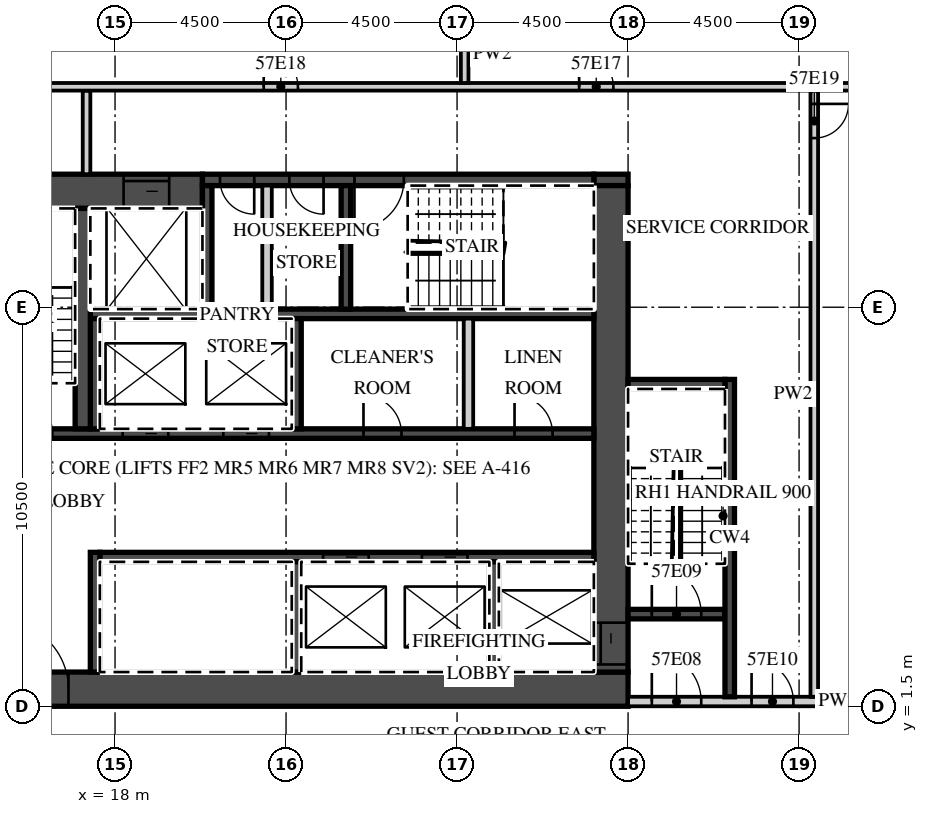
"""IFC4 building model, lengths in metres.
Left out: names, types, materials, properties, quantities, classifications, styles, units other than length and angle.
Written with IfcOpenShell. Run it as: python <this file> out.ifc"""

import sys

from ifc_helpers import new_model, si_unit, direction, frame, frame_2d, origin, place, context, subcontext, project, spatial, rectangle, extrude, element, fill, save


model = new_model("IFC4")
c1 = context("Model", 3, precision=1e-05, world=origin(), true_north=direction((0.0, 1.0)))
c2 = subcontext(c1, "Body", "Model", "MODEL_VIEW")
j1 = project(units=[si_unit("LENGTHUNIT", "METRE"), si_unit("PLANEANGLEUNIT", "RADIAN")], contexts=[c1])
p1 = place(None, origin())
s1 = spatial("IfcSite", under=j1, at=p1, CompositionType="ELEMENT")
p2 = place(p1, origin())
s2 = spatial("IfcBuilding", under=s1, at=p2, CompositionType="ELEMENT")
p3 = place(p2, frame((0.0, 0.0, 234.2)))
s3 = spatial("IfcBuildingStorey", under=s2, at=p3, CompositionType="ELEMENT", Elevation=234.2)
p4 = place(p3, frame((13.5, 1.95, 0.0), z_axis=(0.0, 0.0, 1.0), x_axis=(1.0, 0.0, 0.0)))
e1 = element("IfcWall", 1, at=p4, inside=s3, PredefinedType="SHEAR", context=c2, shape_type="SweptSolid", body=[
    extrude(rectangle(XDim=18.0, YDim=0.9, at=frame_2d((9.0, 0.0))), origin(), (0.0, 0.0, 1.0), 3.02),
])
p5 = place(p4, frame((1.475, 0.0, 0.0)))
e2 = element("IfcOpeningElement", 2, at=p5, cuts=e1, PredefinedType="OPENING", context=c2, shape_type="SweptSolid", body=[
    extrude(rectangle(XDim=1.8, YDim=2.1, at=frame_2d((0.9, 1.05))), frame((0.0, 0.46, 0.0), z_axis=(0.0, -1.0, 0.0), x_axis=(1.0, 0.0, 0.0)), (0.0, 0.0, 1.0), 0.92),
])
p6 = place(p3, frame((13.5, 15.05, 0.0), z_axis=(0.0, 0.0, 1.0), x_axis=(1.0, 0.0, 0.0)))
e3 = element("IfcWall", 3, at=p6, inside=s3, PredefinedType="SHEAR", context=c2, shape_type="SweptSolid", body=[
    extrude(rectangle(XDim=6.8, YDim=0.9, at=frame_2d((3.4, 0.0))), origin(), (0.0, 0.0, 1.0), 3.02),
])
p7 = place(p6, frame((4.725, 0.0, 0.0)))
e4 = element("IfcOpeningElement", 4, at=p7, cuts=e3, PredefinedType="OPENING", context=c2, shape_type="SweptSolid", body=[
    extrude(rectangle(XDim=1.2, YDim=2.1, at=frame_2d((0.6, 1.05))), frame((0.0, 0.46, 0.0), z_axis=(0.0, -1.0, 0.0), x_axis=(1.0, 0.0, 0.0)), (0.0, 0.0, 1.0), 0.92),
])
p8 = place(p3, frame((30.6, 15.35, 0.0), z_axis=(0.0, 0.0, 1.0), x_axis=(1.0, 0.0, 0.0)))
e5 = element("IfcWall", 5, at=p8, inside=s3, PredefinedType="SHEAR", context=c2, shape_type="SweptSolid", body=[
    extrude(rectangle(XDim=0.9, YDim=0.3, at=frame_2d((0.45, 0.0))), origin(), (0.0, 0.0, 1.0), 3.02),
])
p9 = place(p3, frame((20.3, 15.35, 0.0), z_axis=(0.0, 0.0, 1.0), x_axis=(1.0, 0.0, 0.0)))
e6 = element("IfcWall", 6, at=p9, inside=s3, PredefinedType="SHEAR", context=c2, shape_type="SweptSolid", body=[
    extrude(rectangle(XDim=10.3, YDim=0.3, at=frame_2d((5.15, 0.0))), origin(), (0.0, 0.0, 1.0), 3.02),
])
p10 = place(p9, frame((4.0, 0.0, 0.0)))
e7 = element("IfcOpeningElement", 7, at=p10, cuts=e6, PredefinedType="OPENING", context=c2, shape_type="SweptSolid", body=[
    extrude(rectangle(XDim=1.3, YDim=2.1, at=frame_2d((0.65, 1.05))), frame((0.0, 0.16, 0.0), z_axis=(0.0, -1.0, 0.0), x_axis=(1.0, 0.0, 0.0)), (0.0, 0.0, 1.0), 0.32),
])
p11 = place(p9, frame((2.288, 0.0, 0.0)))
e8 = element("IfcOpeningElement", 8, at=p11, cuts=e6, PredefinedType="OPENING", context=c2, shape_type="SweptSolid", body=[
    extrude(rectangle(XDim=0.9, YDim=2.1, at=frame_2d((0.45, 1.05))), frame((0.0, 0.16, 0.0), z_axis=(0.0, -1.0, 0.0), x_axis=(1.0, 0.0, 0.0)), (0.0, 0.0, 1.0), 0.32),
])
p12 = place(p9, frame((0.462, 0.0, 0.0)))
e9 = element("IfcOpeningElement", 9, at=p12, cuts=e6, PredefinedType="OPENING", context=c2, shape_type="SweptSolid", body=[
    extrude(rectangle(XDim=0.9, YDim=2.1, at=frame_2d((0.45, 1.05))), frame((0.0, 0.16, 0.0), z_axis=(0.0, -1.0, 0.0), x_axis=(1.0, 0.0, 0.0)), (0.0, 0.0, 1.0), 0.32),
])
p13 = place(p3, frame((31.05, 2.4, 0.0), z_axis=(0.0, 0.0, 1.0), x_axis=(0.0, 1.0, 0.0)))
e10 = element("IfcWall", 10, at=p13, inside=s3, PredefinedType="SHEAR", context=c2, shape_type="SweptSolid", body=[
    extrude(rectangle(XDim=12.8, YDim=0.9, at=frame_2d((6.4, 0.0))), origin(), (0.0, 0.0, 1.0), 3.02),
])
p14 = place(p13, frame((0.2, 0.0, 0.0)))
e11 = element("IfcOpeningElement", 11, at=p14, cuts=e10, PredefinedType="OPENING", context=c2, shape_type="SweptSolid", body=[
    extrude(rectangle(XDim=1.1, YDim=2.1, at=frame_2d((0.55, 1.05))), frame((0.0, 0.46, 0.0), z_axis=(0.0, -1.0, 0.0), x_axis=(1.0, 0.0, 0.0)), (0.0, 0.0, 1.0), 0.92),
])
p15 = place(p3, frame((17.6, 5.425, 0.0), z_axis=(0.0, 0.0, 1.0), x_axis=(1.0, 0.0, 0.0)))
e12 = element("IfcWall", 12, at=p15, inside=s3, PredefinedType="SHEAR", context=c2, shape_type="SweptSolid", body=[
    extrude(rectangle(XDim=13.0, YDim=0.25, at=frame_2d((6.5, 0.0))), origin(), (0.0, 0.0, 1.0), 3.02),
])
p16 = place(p15, frame((8.475, 0.0, 0.0)))
e13 = element("IfcOpeningElement", 13, at=p16, cuts=e12, PredefinedType="OPENING", context=c2, shape_type="SweptSolid", body=[
    extrude(rectangle(XDim=1.2, YDim=2.1, at=frame_2d((0.6, 1.05))), frame((0.0, 0.135, 0.0), z_axis=(0.0, -1.0, 0.0), x_axis=(1.0, 0.0, 0.0)), (0.0, 0.0, 1.0), 0.27),
])
p17 = place(p15, frame((5.875, 0.0, 0.0)))
e14 = element("IfcOpeningElement", 14, at=p17, cuts=e12, PredefinedType="OPENING", context=c2, shape_type="SweptSolid", body=[
    extrude(rectangle(XDim=1.2, YDim=2.1, at=frame_2d((0.6, 1.05))), frame((0.0, 0.135, 0.0), z_axis=(0.0, -1.0, 0.0), x_axis=(1.0, 0.0, 0.0)), (0.0, 0.0, 1.0), 0.27),
])
p18 = place(p3, frame((17.475, 2.4, 0.0), z_axis=(0.0, 0.0, 1.0), x_axis=(0.0, 1.0, 0.0)))
e15 = element("IfcWall", 15, at=p18, inside=s3, PredefinedType="SHEAR", context=c2, shape_type="SweptSolid", body=[
    extrude(rectangle(XDim=3.15, YDim=0.25, at=frame_2d((1.575, 0.0))), origin(), (0.0, 0.0, 1.0), 3.02),
])
for number, where, z_axis, x_axis in (
    (16, (27.975, 2.4, 0.0), (0.0, 0.0, 1.0), (0.0, 1.0, 0.0)),
    (17, (22.775, 2.4, 0.0), (0.0, 0.0, 1.0), (0.0, 1.0, 0.0)),
):
    element("IfcWall", number, at=place(p3, frame(where, z_axis=z_axis, x_axis=x_axis)), inside=s3, PredefinedType="SHEAR", context=c2, shape_type="SweptSolid", body=[
        extrude(rectangle(XDim=2.9, YDim=0.25, at=frame_2d((1.45, 0.0))), origin(), (0.0, 0.0, 1.0), 3.02),
    ])
p19 = place(p3, frame((14.4, 8.675, 0.0), z_axis=(0.0, 0.0, 1.0), x_axis=(1.0, 0.0, 0.0)))
e18 = element("IfcWall", 18, at=p19, inside=s3, PredefinedType="SHEAR", context=c2, shape_type="SweptSolid", body=[
    extrude(rectangle(XDim=16.2, YDim=0.25, at=frame_2d((8.1, 0.0))), origin(), (0.0, 0.0, 1.0), 3.02),
])
p20 = place(p19, frame((6.45, 0.0, 0.0)))
e19 = element("IfcOpeningElement", 19, at=p20, cuts=e18, PredefinedType="OPENING", context=c2, shape_type="SweptSolid", body=[
    extrude(rectangle(XDim=1.2, YDim=2.1, at=frame_2d((0.6, 1.05))), frame((0.0, 0.135, 0.0), z_axis=(0.0, -1.0, 0.0), x_axis=(1.0, 0.0, 0.0)), (0.0, 0.0, 1.0), 0.27),
])
p21 = place(p19, frame((3.8, 0.0, 0.0)))
e20 = element("IfcOpeningElement", 20, at=p21, cuts=e18, PredefinedType="OPENING", context=c2, shape_type="SweptSolid", body=[
    extrude(rectangle(XDim=1.2, YDim=2.1, at=frame_2d((0.6, 1.05))), frame((0.0, 0.135, 0.0), z_axis=(0.0, -1.0, 0.0), x_axis=(1.0, 0.0, 0.0)), (0.0, 0.0, 1.0), 0.27),
])
p22 = place(p19, frame((0.65, 0.0, 0.0)))
e21 = element("IfcOpeningElement", 21, at=p22, cuts=e18, PredefinedType="OPENING", context=c2, shape_type="SweptSolid", body=[
    extrude(rectangle(XDim=1.3, YDim=2.1, at=frame_2d((0.65, 1.05))), frame((0.0, 0.135, 0.0), z_axis=(0.0, -1.0, 0.0), x_axis=(1.0, 0.0, 0.0)), (0.0, 0.0, 1.0), 0.27),
])
p23 = place(p19, frame((14.113, 0.0, 0.0)))
e22 = element("IfcOpeningElement", 22, at=p23, cuts=e18, PredefinedType="OPENING", context=c2, shape_type="SweptSolid", body=[
    extrude(rectangle(XDim=1.0, YDim=2.1, at=frame_2d((0.5, 1.05))), frame((0.0, 0.135, 0.0), z_axis=(0.0, -1.0, 0.0), x_axis=(1.0, 0.0, 0.0)), (0.0, 0.0, 1.0), 0.27),
])
p24 = place(p19, frame((10.137, 0.0, 0.0)))
e23 = element("IfcOpeningElement", 23, at=p24, cuts=e18, PredefinedType="OPENING", context=c2, shape_type="SweptSolid", body=[
    extrude(rectangle(XDim=1.0, YDim=2.1, at=frame_2d((0.5, 1.05))), frame((0.0, 0.135, 0.0), z_axis=(0.0, -1.0, 0.0), x_axis=(1.0, 0.0, 0.0)), (0.0, 0.0, 1.0), 0.27),
])
p25 = place(p3, frame((17.35, 11.825, 0.0), z_axis=(0.0, 0.0, 1.0), x_axis=(1.0, 0.0, 0.0)))
e24 = element("IfcWall", 24, at=p25, inside=s3, PredefinedType="SHEAR", context=c2, shape_type="SweptSolid", body=[
    extrude(rectangle(XDim=13.25, YDim=0.25, at=frame_2d((6.625, 0.0))), origin(), (0.0, 0.0, 1.0), 3.02),
])
for number, where, z_axis, x_axis in (
    (25, (17.475, 8.8, 0.0), (0.0, 0.0, 1.0), (0.0, 1.0, 0.0)),
    (26, (22.775, 8.8, 0.0), (0.0, 0.0, 1.0), (0.0, 1.0, 0.0)),
):
    element("IfcWall", number, at=place(p3, frame(where, z_axis=z_axis, x_axis=x_axis)), inside=s3, PredefinedType="SHEAR", context=c2, shape_type="SweptSolid", body=[
        extrude(rectangle(XDim=2.9, YDim=0.25, at=frame_2d((1.45, 0.0))), origin(), (0.0, 0.0, 1.0), 3.02),
    ])
p26 = place(p3, frame((27.3, 8.8, 0.0), z_axis=(0.0, 0.0, 1.0), x_axis=(0.0, 1.0, 0.0)))
e27 = element("IfcWall", 27, at=p26, inside=s3, PredefinedType="PARTITIONING", context=c2, shape_type="SweptSolid", body=[
    extrude(rectangle(XDim=2.9, YDim=0.25, at=frame_2d((1.45, 0.0))), origin(), (0.0, 0.0, 1.0), 3.02),
])
p27 = place(p3, frame((17.15, 8.8, 0.0), z_axis=(0.0, 0.0, 1.0), x_axis=(0.0, 1.0, 0.0)))
e28 = element("IfcWall", 28, at=p27, inside=s3, PredefinedType="SHEAR", context=c2, shape_type="SweptSolid", body=[
    extrude(rectangle(XDim=5.8, YDim=0.4, at=frame_2d((2.9, 0.0))), origin(), (0.0, 0.0, 1.0), 3.02),
])
for number, where, z_axis, x_axis in (
    (29, (20.425, 11.95, 0.0), (0.0, 0.0, 1.0), (0.0, 1.0, 0.0)),
    (30, (24.075, 11.95, 0.0), (0.0, 0.0, 1.0), (0.0, 1.0, 0.0)),
):
    element("IfcWall", number, at=place(p3, frame(where, z_axis=z_axis, x_axis=x_axis)), inside=s3, PredefinedType="SHEAR", context=c2, shape_type="SweptSolid", body=[
        extrude(rectangle(XDim=3.25, YDim=0.25, at=frame_2d((1.625, 0.0))), origin(), (0.0, 0.0, 1.0), 3.02),
    ])
p28 = place(p3, frame((22.0, 11.95, 0.0), z_axis=(0.0, 0.0, 1.0), x_axis=(0.0, 1.0, 0.0)))
e31 = element("IfcWall", 31, at=p28, inside=s3, PredefinedType="PARTITIONING", context=c2, shape_type="SweptSolid", body=[
    extrude(rectangle(XDim=3.25, YDim=0.25, at=frame_2d((1.625, 0.0))), origin(), (0.0, 0.0, 1.0), 3.02),
])
p29 = place(p3, frame((31.5, 1.625, 0.0), z_axis=(0.0, 0.0, 1.0), x_axis=(1.0, 0.0, 0.0)))
e32 = element("IfcWall", 32, at=p29, inside=s3, PredefinedType="PARTITIONING", context=c2, shape_type="SweptSolid", body=[
    extrude(rectangle(XDim=11.04, YDim=0.25, at=frame_2d((5.52, 0.0))), origin(), (0.0, 0.0, 1.0), 3.02),
])
p30 = place(p29, frame((0.625, 0.0, 0.0)))
e33 = element("IfcOpeningElement", 33, at=p30, cuts=e32, PredefinedType="OPENING", context=c2, shape_type="SweptSolid", body=[
    extrude(rectangle(XDim=1.3, YDim=2.1, at=frame_2d((0.65, 1.05))), frame((0.0, 0.135, 0.0), z_axis=(0.0, -1.0, 0.0), x_axis=(1.0, 0.0, 0.0)), (0.0, 0.0, 1.0), 0.27),
])
p31 = place(p29, frame((3.25, 0.0, 0.0)))
e34 = element("IfcOpeningElement", 34, at=p31, cuts=e32, PredefinedType="OPENING", context=c2, shape_type="SweptSolid", body=[
    extrude(rectangle(XDim=1.1, YDim=2.1, at=frame_2d((0.55, 1.05))), frame((0.0, 0.135, 0.0), z_axis=(0.0, -1.0, 0.0), x_axis=(1.0, 0.0, 0.0)), (0.0, 0.0, 1.0), 0.27),
])
p32 = place(p3, frame((31.5, 3.925, 0.0), z_axis=(0.0, 0.0, 1.0), x_axis=(1.0, 0.0, 0.0)))
e35 = element("IfcWall", 35, at=p32, inside=s3, PredefinedType="SHEAR", context=c2, shape_type="SweptSolid", body=[
    extrude(rectangle(XDim=2.55, YDim=0.25, at=frame_2d((1.275, 0.0))), origin(), (0.0, 0.0, 1.0), 3.02),
])
p33 = place(p32, frame((0.625, 0.0, 0.0)))
e36 = element("IfcOpeningElement", 36, at=p33, cuts=e35, PredefinedType="OPENING", context=c2, shape_type="SweptSolid", body=[
    extrude(rectangle(XDim=1.3, YDim=2.1, at=frame_2d((0.65, 1.05))), frame((0.0, 0.135, 0.0), z_axis=(0.0, -1.0, 0.0), x_axis=(1.0, 0.0, 0.0)), (0.0, 0.0, 1.0), 0.27),
])
p34 = place(p3, frame((34.175, 1.75, 0.0), z_axis=(0.0, 0.0, 1.0), x_axis=(0.0, 1.0, 0.0)))
e37 = element("IfcWall", 37, at=p34, inside=s3, PredefinedType="SHEAR", context=c2, shape_type="SweptSolid", body=[
    extrude(rectangle(XDim=8.35, YDim=0.25, at=frame_2d((4.175, 0.0))), origin(), (0.0, 0.0, 1.0), 3.02),
])
p35 = place(p3, frame((31.5, 9.975, 0.0), z_axis=(0.0, 0.0, 1.0), x_axis=(1.0, 0.0, 0.0)))
e38 = element("IfcWall", 38, at=p35, inside=s3, PredefinedType="SHEAR", context=c2, shape_type="SweptSolid", body=[
    extrude(rectangle(XDim=2.55, YDim=0.25, at=frame_2d((1.275, 0.0))), origin(), (0.0, 0.0, 1.0), 3.02),
])
p36 = place(p3, frame((17.25, 15.5, 0.0), z_axis=(0.0, 0.0, 1.0), x_axis=(0.0, 1.0, 0.0)))
e39 = element("IfcWall", 39, at=p36, inside=s3, PredefinedType="PARTITIONING", context=c2, shape_type="SweptSolid", body=[
    extrude(rectangle(XDim=2.2, YDim=0.2, at=frame_2d((1.1, 0.0))), origin(), (0.0, 0.0, 1.0), 3.02),
])
p37 = place(p3, frame((36.4, 1.75, 0.0), z_axis=(0.0, 0.0, 1.0), x_axis=(0.0, 1.0, 0.0)))
e40 = element("IfcWall", 40, at=p37, inside=s3, PredefinedType="PARTITIONING", context=c2, shape_type="SweptSolid", body=[
    extrude(rectangle(XDim=15.95, YDim=0.2, at=frame_2d((7.975, 0.0))), origin(), (0.0, 0.0, 1.0), 3.02),
])
p38 = place(p37, frame((14.7, 0.0, 0.0)))
e41 = element("IfcOpeningElement", 41, at=p38, cuts=e40, PredefinedType="OPENING", context=c2, shape_type="SweptSolid", body=[
    extrude(rectangle(XDim=0.9, YDim=2.1, at=frame_2d((0.45, 1.05))), frame((0.0, 0.11, 0.0), z_axis=(0.0, -1.0, 0.0), x_axis=(1.0, 0.0, 0.0)), (0.0, 0.0, 1.0), 0.22),
])
p39 = place(p3, frame((13.6, 17.8, 0.0), z_axis=(0.0, 0.0, 1.0), x_axis=(1.0, 0.0, 0.0)))
e42 = element("IfcWall", 42, at=p39, inside=s3, PredefinedType="PARTITIONING", context=c2, shape_type="SweptSolid", body=[
    extrude(rectangle(XDim=28.657, YDim=0.2, at=frame_2d((14.329, 0.0))), origin(), (0.0, 0.0, 1.0), 3.02),
])
p40 = place(p39, frame((16.613, 0.0, 0.0)))
e43 = element("IfcOpeningElement", 43, at=p40, cuts=e42, PredefinedType="OPENING", context=c2, shape_type="SweptSolid", body=[
    extrude(rectangle(XDim=0.9, YDim=2.1, at=frame_2d((0.45, 1.05))), frame((0.0, 0.11, 0.0), z_axis=(0.0, -1.0, 0.0), x_axis=(1.0, 0.0, 0.0)), (0.0, 0.0, 1.0), 0.22),
])
p41 = place(p39, frame((8.312, 0.0, 0.0)))
e44 = element("IfcOpeningElement", 44, at=p41, cuts=e42, PredefinedType="OPENING", context=c2, shape_type="SweptSolid", body=[
    extrude(rectangle(XDim=0.9, YDim=2.1, at=frame_2d((0.45, 1.05))), frame((0.0, 0.11, 0.0), z_axis=(0.0, -1.0, 0.0), x_axis=(1.0, 0.0, 0.0)), (0.0, 0.0, 1.0), 0.22),
])
p42 = place(p3, frame((27.2, 17.9, 0.0), z_axis=(0.0, 0.0, 1.0), x_axis=(0.0, 1.0, 0.0)))
e45 = element("IfcWall", 45, at=p42, inside=s3, PredefinedType="PARTITIONING", context=c2, shape_type="SweptSolid", body=[
    extrude(rectangle(XDim=3.276, YDim=0.2, at=frame_2d((1.638, 0.0))), origin(), (0.0, 0.0, 1.0), 3.02),
])
p43 = place(p20, origin())
e46 = element("IfcDoor", 46, at=p43, inside=s3, OperationType="SLIDING_TO_LEFT", PredefinedType="DOOR", context=c2, shape_type="SweptSolid", body=[
    extrude(rectangle(XDim=1.2, YDim=2.1, at=frame_2d((0.6, 1.05))), frame((0.0, 0.025, 0.0), z_axis=(0.0, -1.0, 0.0), x_axis=(1.0, 0.0, 0.0)), (0.0, 0.0, 1.0), 0.05),
])
fill(e19, e46)
p44 = place(p21, origin())
e47 = element("IfcDoor", 47, at=p44, inside=s3, OperationType="SLIDING_TO_RIGHT", PredefinedType="DOOR", context=c2, shape_type="SweptSolid", body=[
    extrude(rectangle(XDim=1.2, YDim=2.1, at=frame_2d((0.6, 1.05))), frame((0.0, 0.025, 0.0), z_axis=(0.0, -1.0, 0.0), x_axis=(1.0, 0.0, 0.0)), (0.0, 0.0, 1.0), 0.05),
])
fill(e20, e47)
p45 = place(p16, origin())
e48 = element("IfcDoor", 48, at=p45, inside=s3, OperationType="SLIDING_TO_LEFT", PredefinedType="DOOR", context=c2, shape_type="SweptSolid", body=[
    extrude(rectangle(XDim=1.2, YDim=2.1, at=frame_2d((0.6, 1.05))), frame((0.0, 0.025, 0.0), z_axis=(0.0, -1.0, 0.0), x_axis=(1.0, 0.0, 0.0)), (0.0, 0.0, 1.0), 0.05),
])
fill(e13, e48)
p46 = place(p17, origin())
e49 = element("IfcDoor", 49, at=p46, inside=s3, OperationType="SLIDING_TO_RIGHT", PredefinedType="DOOR", context=c2, shape_type="SweptSolid", body=[
    extrude(rectangle(XDim=1.2, YDim=2.1, at=frame_2d((0.6, 1.05))), frame((0.0, 0.025, 0.0), z_axis=(0.0, -1.0, 0.0), x_axis=(1.0, 0.0, 0.0)), (0.0, 0.0, 1.0), 0.05),
])
fill(e14, e49)
p47 = place(p7, origin())
e50 = element("IfcDoor", 50, at=p47, inside=s3, OperationType="SLIDING_TO_LEFT", PredefinedType="DOOR", context=c2, shape_type="SweptSolid", body=[
    extrude(rectangle(XDim=1.2, YDim=2.1, at=frame_2d((0.6, 1.05))), frame((0.0, 0.025, 0.0), z_axis=(0.0, -1.0, 0.0), x_axis=(1.0, 0.0, 0.0)), (0.0, 0.0, 1.0), 0.05),
])
fill(e4, e50)
p48 = place(p14, origin())
e51 = element("IfcDoor", 51, at=p48, inside=s3, OperationType="SLIDING_TO_LEFT", PredefinedType="DOOR", context=c2, shape_type="SweptSolid", body=[
    extrude(rectangle(XDim=1.1, YDim=2.1, at=frame_2d((0.55, 1.05))), frame((0.0, 0.025, 0.0), z_axis=(0.0, -1.0, 0.0), x_axis=(1.0, 0.0, 0.0)), (0.0, 0.0, 1.0), 0.05),
])
fill(e11, e51)
p49 = place(p5, origin())
e52 = element("IfcDoor", 52, at=p49, inside=s3, OperationType="DOUBLE_DOOR_DOUBLE_SWING", PredefinedType="DOOR", context=c2, shape_type="SweptSolid", body=[
    extrude(rectangle(XDim=1.8, YDim=2.1, at=frame_2d((0.9, 1.05))), frame((0.0, 0.025, 0.0), z_axis=(0.0, -1.0, 0.0), x_axis=(1.0, 0.0, 0.0)), (0.0, 0.0, 1.0), 0.05),
])
fill(e2, e52)
p50 = place(p30, origin())
e53 = element("IfcDoor", 53, at=p50, inside=s3, OperationType="SINGLE_SWING_LEFT", PredefinedType="DOOR", context=c2, shape_type="SweptSolid", body=[
    extrude(rectangle(XDim=1.3, YDim=2.1, at=frame_2d((0.65, 1.05))), frame((0.0, 0.025, 0.0), z_axis=(0.0, -1.0, 0.0), x_axis=(1.0, 0.0, 0.0)), (0.0, 0.0, 1.0), 0.05),
])
fill(e33, e53)
p51 = place(p33, origin())
e54 = element("IfcDoor", 54, at=p51, inside=s3, OperationType="SINGLE_SWING_LEFT", PredefinedType="DOOR", context=c2, shape_type="SweptSolid", body=[
    extrude(rectangle(XDim=1.3, YDim=2.1, at=frame_2d((0.65, 1.05))), frame((0.0, 0.025, 0.0), z_axis=(0.0, -1.0, 0.0), x_axis=(1.0, 0.0, 0.0)), (0.0, 0.0, 1.0), 0.05),
])
fill(e36, e54)
p52 = place(p31, origin())
e55 = element("IfcDoor", 55, at=p52, inside=s3, OperationType="SINGLE_SWING_LEFT", PredefinedType="DOOR", context=c2, shape_type="SweptSolid", body=[
    extrude(rectangle(XDim=1.1, YDim=2.1, at=frame_2d((0.55, 1.05))), frame((0.0, 0.025, 0.0), z_axis=(0.0, -1.0, 0.0), x_axis=(1.0, 0.0, 0.0)), (0.0, 0.0, 1.0), 0.05),
])
fill(e34, e55)
p53 = place(p10, origin())
e56 = element("IfcDoor", 56, at=p53, inside=s3, OperationType="SINGLE_SWING_LEFT", PredefinedType="DOOR", context=c2, shape_type="SweptSolid", body=[
    extrude(rectangle(XDim=1.3, YDim=2.1, at=frame_2d((0.65, 1.05))), frame((0.0, 0.025, 0.0), z_axis=(0.0, -1.0, 0.0), x_axis=(1.0, 0.0, 0.0)), (0.0, 0.0, 1.0), 0.05),
])
fill(e7, e56)
p54 = place(p11, origin())
e57 = element("IfcDoor", 57, at=p54, inside=s3, OperationType="SINGLE_SWING_RIGHT", PredefinedType="DOOR", context=c2, shape_type="SweptSolid", body=[
    extrude(rectangle(XDim=0.9, YDim=2.1, at=frame_2d((0.45, 1.05))), frame((0.0, 0.025, 0.0), z_axis=(0.0, -1.0, 0.0), x_axis=(1.0, 0.0, 0.0)), (0.0, 0.0, 1.0), 0.05),
])
fill(e8, e57)
p55 = place(p12, origin())
e58 = element("IfcDoor", 58, at=p55, inside=s3, OperationType="SINGLE_SWING_RIGHT", PredefinedType="DOOR", context=c2, shape_type="SweptSolid", body=[
    extrude(rectangle(XDim=0.9, YDim=2.1, at=frame_2d((0.45, 1.05))), frame((0.0, 0.025, 0.0), z_axis=(0.0, -1.0, 0.0), x_axis=(1.0, 0.0, 0.0)), (0.0, 0.0, 1.0), 0.05),
])
fill(e9, e58)
p56 = place(p23, origin())
e59 = element("IfcDoor", 59, at=p56, inside=s3, OperationType="SINGLE_SWING_LEFT", PredefinedType="DOOR", context=c2, shape_type="SweptSolid", body=[
    extrude(rectangle(XDim=1.0, YDim=2.1, at=frame_2d((0.5, 1.05))), frame((0.0, 0.025, 0.0), z_axis=(0.0, -1.0, 0.0), x_axis=(1.0, 0.0, 0.0)), (0.0, 0.0, 1.0), 0.05),
])
fill(e22, e59)
p57 = place(p24, origin())
e60 = element("IfcDoor", 60, at=p57, inside=s3, OperationType="SINGLE_SWING_LEFT", PredefinedType="DOOR", context=c2, shape_type="SweptSolid", body=[
    extrude(rectangle(XDim=1.0, YDim=2.1, at=frame_2d((0.5, 1.05))), frame((0.0, 0.025, 0.0), z_axis=(0.0, -1.0, 0.0), x_axis=(1.0, 0.0, 0.0)), (0.0, 0.0, 1.0), 0.05),
])
fill(e23, e60)
p58 = place(p40, origin())
e61 = element("IfcDoor", 61, at=p58, inside=s3, OperationType="SINGLE_SWING_LEFT", PredefinedType="DOOR", context=c2, shape_type="SweptSolid", body=[
    extrude(rectangle(XDim=0.9, YDim=2.1, at=frame_2d((0.45, 1.05))), frame((0.0, 0.025, 0.0), z_axis=(0.0, -1.0, 0.0), x_axis=(1.0, 0.0, 0.0)), (0.0, 0.0, 1.0), 0.05),
])
fill(e43, e61)
p59 = place(p41, origin())
e62 = element("IfcDoor", 62, at=p59, inside=s3, OperationType="SINGLE_SWING_LEFT", PredefinedType="DOOR", context=c2, shape_type="SweptSolid", body=[
    extrude(rectangle(XDim=0.9, YDim=2.1, at=frame_2d((0.45, 1.05))), frame((0.0, 0.025, 0.0), z_axis=(0.0, -1.0, 0.0), x_axis=(1.0, 0.0, 0.0)), (0.0, 0.0, 1.0), 0.05),
])
fill(e44, e62)
p60 = place(p38, origin())
e63 = element("IfcDoor", 63, at=p60, inside=s3, OperationType="SINGLE_SWING_RIGHT", PredefinedType="DOOR", context=c2, shape_type="SweptSolid", body=[
    extrude(rectangle(XDim=0.9, YDim=2.1, at=frame_2d((0.45, 1.05))), frame((0.0, 0.025, 0.0), z_axis=(0.0, -1.0, 0.0), x_axis=(1.0, 0.0, 0.0)), (0.0, 0.0, 1.0), 0.05),
])
fill(e41, e63)
save(model, sys.argv[1])
